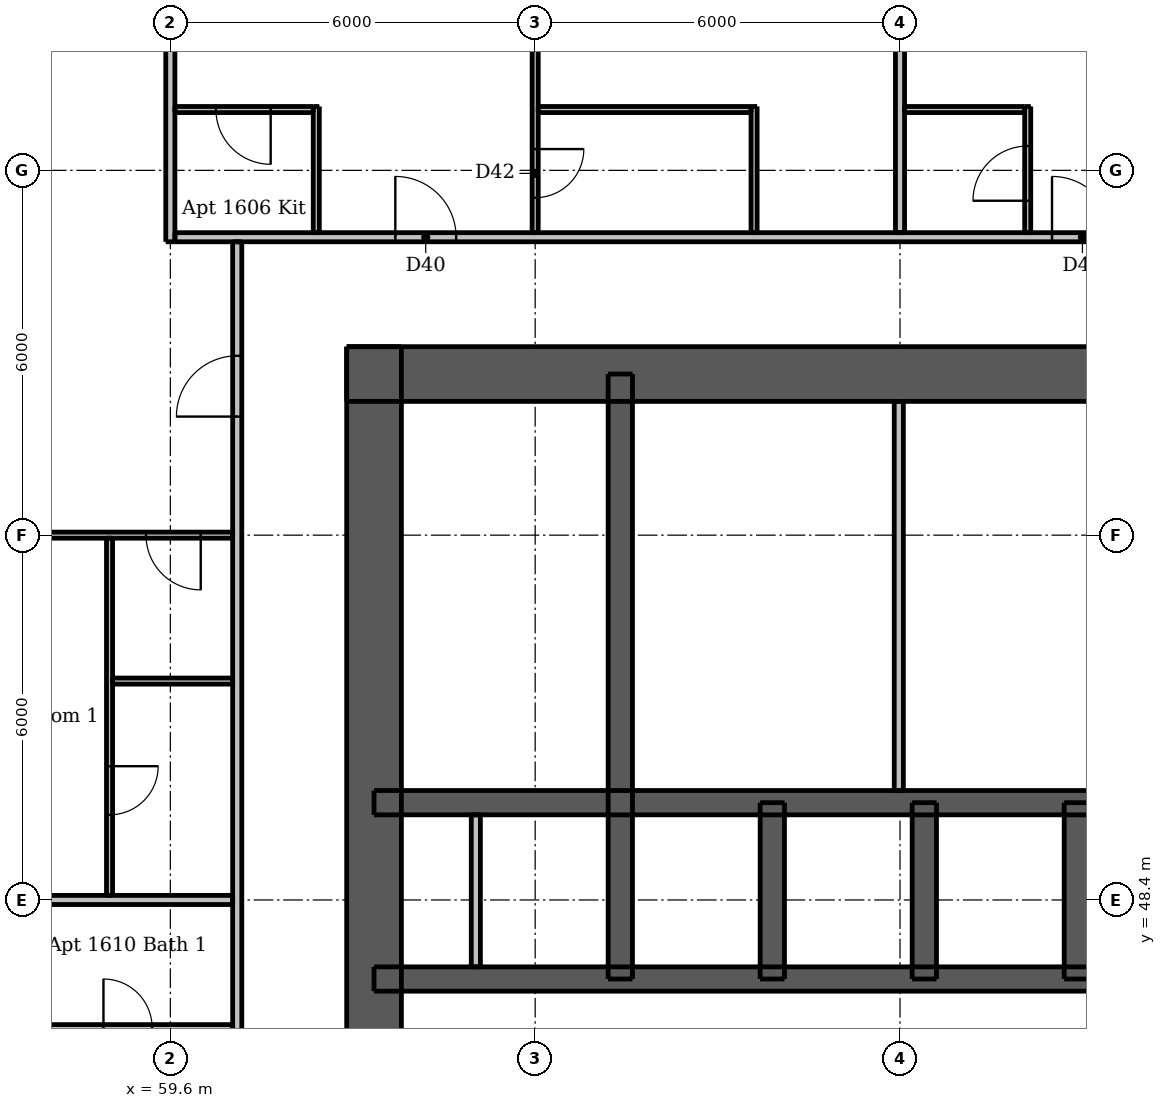
"""IFC4 building model, lengths in metres.
Left out: names, types, materials, properties, quantities, classifications, styles, units other than length and angle.
Written with IfcOpenShell. Run it as: python <this file> out.ifc"""

import sys

from ifc_helpers import new_model, si_unit, direction, frame, frame_2d, origin, place, context, subcontext, project, spatial, rectangle, extrude, element, fill, save


model = new_model("IFC4")
c1 = context("Model", 3, precision=1e-05, world=origin(), true_north=direction((0.0, 1.0)))
c2 = subcontext(c1, "Body", "Model", "MODEL_VIEW")
j1 = project(units=[si_unit("LENGTHUNIT", "METRE"), si_unit("PLANEANGLEUNIT", "RADIAN")], contexts=[c1])
p1 = place(None, origin())
s1 = spatial("IfcSite", under=j1, at=p1, CompositionType="ELEMENT")
p2 = place(p1, origin())
s2 = spatial("IfcBuilding", under=s1, at=p2, CompositionType="ELEMENT")
p3 = place(p2, frame((0.0, 0.0, 59.8)))
s3 = spatial("IfcBuildingStorey", under=s2, at=p3, CompositionType="ELEMENT", Elevation=59.8)
p4 = place(p3, frame((62.5, 57.05, 0.0), z_axis=(0.0, 0.0, 1.0), x_axis=(1.0, 0.0, 0.0)))
e1 = element("IfcWall", 1, at=p4, inside=s3, PredefinedType="SHEAR", context=c2, shape_type="SweptSolid", body=[
    extrude(rectangle(XDim=24.0, YDim=0.9, at=frame_2d((12.0, 0.0))), origin(), (0.0, 0.0, 1.0), 3.05),
])
p5 = place(p4, frame((20.85, 0.0, 0.0)))
e2 = element("IfcOpeningElement", 2, at=p5, cuts=e1, PredefinedType="OPENING", context=c2, shape_type="SweptSolid", body=[
    extrude(rectangle(XDim=1.1, YDim=2.1, at=frame_2d((0.55, 1.05))), frame((0.0, 0.46, 0.0), z_axis=(0.0, -1.0, 0.0), x_axis=(1.0, 0.0, 0.0)), (0.0, 0.0, 1.0), 0.92),
])
p6 = place(p4, frame((2.05, 0.0, 0.0)))
e3 = element("IfcOpeningElement", 3, at=p6, cuts=e1, PredefinedType="OPENING", context=c2, shape_type="SweptSolid", body=[
    extrude(rectangle(XDim=1.1, YDim=2.1, at=frame_2d((0.55, 1.05))), frame((0.0, 0.46, 0.0), z_axis=(0.0, -1.0, 0.0), x_axis=(1.0, 0.0, 0.0)), (0.0, 0.0, 1.0), 0.92),
])
p7 = place(p4, frame((6.44, 0.0, 0.0)))
e4 = element("IfcOpeningElement", 4, at=p7, cuts=e1, PredefinedType="OPENING", context=c2, shape_type="SweptSolid", body=[
    extrude(rectangle(XDim=0.9, YDim=2.1, at=frame_2d((0.45, 1.05))), frame((0.0, 0.46, 0.0), z_axis=(0.0, -1.0, 0.0), x_axis=(1.0, 0.0, 0.0)), (0.0, 0.0, 1.0), 0.92),
])
p8 = place(p4, frame((13.74, 0.0, 0.0)))
e5 = element("IfcOpeningElement", 5, at=p8, cuts=e1, PredefinedType="OPENING", context=c2, shape_type="SweptSolid", body=[
    extrude(rectangle(XDim=0.9, YDim=2.1, at=frame_2d((0.45, 1.05))), frame((0.0, 0.46, 0.0), z_axis=(0.0, -1.0, 0.0), x_axis=(1.0, 0.0, 0.0)), (0.0, 0.0, 1.0), 0.92),
])
p9 = place(p3, frame((62.95, 33.5, 0.0), z_axis=(0.0, 0.0, 1.0), x_axis=(0.0, 1.0, 0.0)))
e6 = element("IfcWall", 6, at=p9, inside=s3, PredefinedType="SHEAR", context=c2, shape_type="SweptSolid", body=[
    extrude(rectangle(XDim=24.0, YDim=0.9, at=frame_2d((12.0, 0.0))), origin(), (0.0, 0.0, 1.0), 3.05),
])
p10 = place(p9, frame((11.2, 0.0, 0.0)))
e7 = element("IfcOpeningElement", 7, at=p10, cuts=e6, PredefinedType="OPENING", context=c2, shape_type="SweptSolid", body=[
    extrude(rectangle(XDim=1.6, YDim=2.1, at=frame_2d((0.8, 1.05))), frame((0.0, 0.46, 0.0), z_axis=(0.0, -1.0, 0.0), x_axis=(1.0, 0.0, 0.0)), (0.0, 0.0, 1.0), 0.92),
])
p11 = place(p3, frame((62.95, 47.1, 0.0), z_axis=(0.0, 0.0, 1.0), x_axis=(1.0, 0.0, 0.0)))
e8 = element("IfcWall", 8, at=p11, inside=s3, PredefinedType="SHEAR", context=c2, shape_type="SweptSolid", body=[
    extrude(rectangle(XDim=23.1, YDim=0.4, at=frame_2d((11.55, 0.0))), origin(), (0.0, 0.0, 1.0), 3.05),
])
p12 = place(p11, frame((0.662, 0.0, 0.0)))
e9 = element("IfcOpeningElement", 9, at=p12, cuts=e8, PredefinedType="OPENING", context=c2, shape_type="SweptSolid", body=[
    extrude(rectangle(XDim=0.8, YDim=2.1, at=frame_2d((0.4, 1.05))), frame((0.0, 0.21, 0.0), z_axis=(0.0, -1.0, 0.0), x_axis=(1.0, 0.0, 0.0)), (0.0, 0.0, 1.0), 0.42),
])
p13 = place(p11, frame((2.312, 0.0, 0.0)))
e10 = element("IfcOpeningElement", 10, at=p13, cuts=e8, PredefinedType="OPENING", context=c2, shape_type="SweptSolid", body=[
    extrude(rectangle(XDim=0.9, YDim=2.1, at=frame_2d((0.45, 1.05))), frame((0.0, 0.21, 0.0), z_axis=(0.0, -1.0, 0.0), x_axis=(1.0, 0.0, 0.0)), (0.0, 0.0, 1.0), 0.42),
])
p14 = place(p11, frame((20.5, 0.0, 0.0)))
e11 = element("IfcOpeningElement", 11, at=p14, cuts=e8, PredefinedType="OPENING", context=c2, shape_type="SweptSolid", body=[
    extrude(rectangle(XDim=0.9, YDim=2.1, at=frame_2d((0.45, 1.05))), frame((0.0, 0.21, 0.0), z_axis=(0.0, -1.0, 0.0), x_axis=(1.0, 0.0, 0.0)), (0.0, 0.0, 1.0), 0.42),
])
p15 = place(p3, frame((62.95, 50.0, 0.0), z_axis=(0.0, 0.0, 1.0), x_axis=(1.0, 0.0, 0.0)))
e12 = element("IfcWall", 12, at=p15, inside=s3, PredefinedType="SHEAR", context=c2, shape_type="SweptSolid", body=[
    extrude(rectangle(XDim=23.1, YDim=0.4, at=frame_2d((11.55, 0.0))), origin(), (0.0, 0.0, 1.0), 3.05),
])
p16 = place(p3, frame((67.0, 47.1, 0.0), z_axis=(0.0, 0.0, 1.0), x_axis=(0.0, 1.0, 0.0)))
e13 = element("IfcWall", 13, at=p16, inside=s3, PredefinedType="SHEAR", context=c2, shape_type="SweptSolid", body=[
    extrude(rectangle(XDim=9.95, YDim=0.4, at=frame_2d((4.975, 0.0))), origin(), (0.0, 0.0, 1.0), 3.05),
])
for number, where, z_axis, x_axis in (
    (14, (69.5, 47.1, 0.0), (0.0, 0.0, 1.0), (0.0, 1.0, 0.0)),
    (15, (72.0, 47.1, 0.0), (0.0, 0.0, 1.0), (0.0, 1.0, 0.0)),
    (16, (74.5, 47.1, 0.0), (0.0, 0.0, 1.0), (0.0, 1.0, 0.0)),
):
    element("IfcWall", number, at=place(p3, frame(where, z_axis=z_axis, x_axis=x_axis)), inside=s3, PredefinedType="SHEAR", context=c2, shape_type="SweptSolid", body=[
        extrude(rectangle(XDim=2.9, YDim=0.4, at=frame_2d((1.45, 0.0))), origin(), (0.0, 0.0, 1.0), 3.05),
    ])
p17 = place(p3, frame((64.624, 47.3, 0.0), z_axis=(0.0, 0.0, 1.0), x_axis=(0.0, 1.0, 0.0)))
e17 = element("IfcWall", 17, at=p17, inside=s3, PredefinedType="PLUMBINGWALL", context=c2, shape_type="SweptSolid", body=[
    extrude(rectangle(XDim=2.5, YDim=0.15, at=frame_2d((1.25, 0.0))), origin(), (0.0, 0.0, 1.0), 3.05),
])
p18 = place(p3, frame((71.58, 50.2, 0.0), z_axis=(0.0, 0.0, 1.0), x_axis=(0.0, 1.0, 0.0)))
e18 = element("IfcWall", 18, at=p18, inside=s3, PredefinedType="PLUMBINGWALL", context=c2, shape_type="SweptSolid", body=[
    extrude(rectangle(XDim=6.4, YDim=0.15, at=frame_2d((3.2, 0.0))), origin(), (0.0, 0.0, 1.0), 3.05),
])
p19 = place(p3, frame((58.6, 54.35, 0.0), z_axis=(0.0, 0.0, 1.0), x_axis=(0.0, -1.0, 0.0)))
e19 = element("IfcWall", 19, at=p19, inside=s3, PredefinedType="PARTITIONING", context=c2, shape_type="SweptSolid", body=[
    extrude(rectangle(XDim=5.875, YDim=0.1, at=frame_2d((2.938, 0.0))), origin(), (0.0, 0.0, 1.0), 3.05),
])
p20 = place(p19, frame((3.75, 0.0, 0.0)))
e20 = element("IfcOpeningElement", 20, at=p20, cuts=e19, PredefinedType="OPENING", context=c2, shape_type="SweptSolid", body=[
    extrude(rectangle(XDim=0.8, YDim=2.1, at=frame_2d((0.4, 1.05))), frame((0.0, 0.06, 0.0), z_axis=(0.0, -1.0, 0.0), x_axis=(1.0, 0.0, 0.0)), (0.0, 0.0, 1.0), 0.12),
])
p21 = place(p3, frame((62.0, 59.375, 0.0), z_axis=(0.0, 0.0, 1.0), x_axis=(0.0, 1.0, 0.0)))
e21 = element("IfcWall", 21, at=p21, inside=s3, PredefinedType="PARTITIONING", context=c2, shape_type="SweptSolid", body=[
    extrude(rectangle(XDim=2.075, YDim=0.1, at=frame_2d((1.038, 0.0))), origin(), (0.0, 0.0, 1.0), 3.05),
])
p22 = place(p3, frame((65.6, 68.0, 0.0), z_axis=(0.0, 0.0, 1.0), x_axis=(0.0, -1.0, 0.0)))
e22 = element("IfcWall", 22, at=p22, inside=s3, PredefinedType="PARTITIONING", context=c2, shape_type="SweptSolid", body=[
    extrude(rectangle(XDim=8.625, YDim=0.1, at=frame_2d((4.312, 0.0))), origin(), (0.0, 0.0, 1.0), 2.516),
])
p23 = place(p22, frame((2.85, 0.0, 0.0)))
e23 = element("IfcOpeningElement", 23, at=p23, cuts=e22, PredefinedType="OPENING", context=c2, shape_type="SweptSolid", body=[
    extrude(rectangle(XDim=0.9, YDim=2.1, at=frame_2d((0.45, 1.05))), frame((0.0, 0.06, 0.0), z_axis=(0.0, -1.0, 0.0), x_axis=(1.0, 0.0, 0.0)), (0.0, 0.0, 1.0), 0.12),
])
p24 = place(p22, frame((7.25, 0.0, 0.0)))
e24 = element("IfcOpeningElement", 24, at=p24, cuts=e22, PredefinedType="OPENING", context=c2, shape_type="SweptSolid", body=[
    extrude(rectangle(XDim=0.8, YDim=2.1, at=frame_2d((0.4, 1.05))), frame((0.0, 0.06, 0.0), z_axis=(0.0, -1.0, 0.0), x_axis=(1.0, 0.0, 0.0)), (0.0, 0.0, 1.0), 0.12),
])
p25 = place(p3, frame((69.2, 59.375, 0.0), z_axis=(0.0, 0.0, 1.0), x_axis=(0.0, 1.0, 0.0)))
e25 = element("IfcWall", 25, at=p25, inside=s3, PredefinedType="PARTITIONING", context=c2, shape_type="SweptSolid", body=[
    extrude(rectangle(XDim=2.075, YDim=0.1, at=frame_2d((1.038, 0.0))), origin(), (0.0, 0.0, 1.0), 3.05),
])
p26 = place(p3, frame((73.7, 59.375, 0.0), z_axis=(0.0, 0.0, 1.0), x_axis=(0.0, 1.0, 0.0)))
e26 = element("IfcWall", 26, at=p26, inside=s3, PredefinedType="PARTITIONING", context=c2, shape_type="SweptSolid", body=[
    extrude(rectangle(XDim=2.075, YDim=0.1, at=frame_2d((1.038, 0.0))), origin(), (0.0, 0.0, 1.0), 3.05),
])
p27 = place(p26, frame((0.525, 0.0, 0.0)))
e27 = element("IfcOpeningElement", 27, at=p27, cuts=e26, PredefinedType="OPENING", context=c2, shape_type="SweptSolid", body=[
    extrude(rectangle(XDim=0.9, YDim=2.1, at=frame_2d((0.45, 1.05))), frame((0.0, 0.06, 0.0), z_axis=(0.0, -1.0, 0.0), x_axis=(1.0, 0.0, 0.0)), (0.0, 0.0, 1.0), 0.12),
])
p28 = place(p3, frame((61.95, 61.4, 0.0), z_axis=(0.0, 0.0, 1.0), x_axis=(-1.0, 0.0, 0.0)))
e28 = element("IfcWall", 28, at=p28, inside=s3, PredefinedType="PARTITIONING", context=c2, shape_type="SweptSolid", body=[
    extrude(rectangle(XDim=2.275, YDim=0.1, at=frame_2d((1.137, 0.0))), origin(), (0.0, 0.0, 1.0), 3.05),
])
p29 = place(p28, frame((0.7, 0.0, 0.0)))
e29 = element("IfcOpeningElement", 29, at=p29, cuts=e28, PredefinedType="OPENING", context=c2, shape_type="SweptSolid", body=[
    extrude(rectangle(XDim=0.9, YDim=2.1, at=frame_2d((0.45, 1.05))), frame((0.0, 0.06, 0.0), z_axis=(0.0, -1.0, 0.0), x_axis=(1.0, 0.0, 0.0)), (0.0, 0.0, 1.0), 0.12),
])
p30 = place(p3, frame((65.65, 61.4, 0.0), z_axis=(0.0, 0.0, 1.0), x_axis=(1.0, 0.0, 0.0)))
e30 = element("IfcWall", 30, at=p30, inside=s3, PredefinedType="PARTITIONING", context=c2, shape_type="SweptSolid", body=[
    extrude(rectangle(XDim=3.5, YDim=0.1, at=frame_2d((1.75, 0.0))), origin(), (0.0, 0.0, 1.0), 3.05),
])
p31 = place(p3, frame((71.675, 61.4, 0.0), z_axis=(0.0, 0.0, 1.0), x_axis=(1.0, 0.0, 0.0)))
e31 = element("IfcWall", 31, at=p31, inside=s3, PredefinedType="PARTITIONING", context=c2, shape_type="SweptSolid", body=[
    extrude(rectangle(XDim=1.975, YDim=0.1, at=frame_2d((0.987, 0.0))), origin(), (0.0, 0.0, 1.0), 3.05),
])
p32 = place(p3, frame((60.625, 54.4, 0.0), z_axis=(0.0, 0.0, 1.0), x_axis=(-1.0, 0.0, 0.0)))
e32 = element("IfcWall", 32, at=p32, inside=s3, PredefinedType="PARTITIONING", context=c2, shape_type="SweptSolid", body=[
    extrude(rectangle(XDim=8.625, YDim=0.1, at=frame_2d((4.312, 0.0))), origin(), (0.0, 0.0, 1.0), 2.516),
])
p33 = place(p32, frame((0.525, 0.0, 0.0)))
e33 = element("IfcOpeningElement", 33, at=p33, cuts=e32, PredefinedType="OPENING", context=c2, shape_type="SweptSolid", body=[
    extrude(rectangle(XDim=0.9, YDim=2.1, at=frame_2d((0.45, 1.05))), frame((0.0, 0.06, 0.0), z_axis=(0.0, -1.0, 0.0), x_axis=(1.0, 0.0, 0.0)), (0.0, 0.0, 1.0), 0.12),
])
p34 = place(p32, frame((4.875, 0.0, 0.0)))
e34 = element("IfcOpeningElement", 34, at=p34, cuts=e32, PredefinedType="OPENING", context=c2, shape_type="SweptSolid", body=[
    extrude(rectangle(XDim=0.9, YDim=2.1, at=frame_2d((0.45, 1.05))), frame((0.0, 0.06, 0.0), z_axis=(0.0, -1.0, 0.0), x_axis=(1.0, 0.0, 0.0)), (0.0, 0.0, 1.0), 0.12),
])
p35 = place(p3, frame((58.65, 52.0, 0.0), z_axis=(0.0, 0.0, 1.0), x_axis=(1.0, 0.0, 0.0)))
e35 = element("IfcWall", 35, at=p35, inside=s3, PredefinedType="PARTITIONING", context=c2, shape_type="SweptSolid", body=[
    extrude(rectangle(XDim=1.975, YDim=0.1, at=frame_2d((0.988, 0.0))), origin(), (0.0, 0.0, 1.0), 3.05),
])
p36 = place(p3, frame((57.15, 46.3, 0.0), z_axis=(0.0, 0.0, 1.0), x_axis=(1.0, 0.0, 0.0)))
e36 = element("IfcWall", 36, at=p36, inside=s3, PredefinedType="PARTITIONING", context=c2, shape_type="SweptSolid", body=[
    extrude(rectangle(XDim=3.475, YDim=0.1, at=frame_2d((1.738, 0.0))), origin(), (0.0, 0.0, 1.0), 3.05),
])
p37 = place(p36, frame((1.35, 0.0, 0.0)))
e37 = element("IfcOpeningElement", 37, at=p37, cuts=e36, PredefinedType="OPENING", context=c2, shape_type="SweptSolid", body=[
    extrude(rectangle(XDim=0.8, YDim=2.1, at=frame_2d((0.4, 1.05))), frame((0.0, 0.06, 0.0), z_axis=(0.0, -1.0, 0.0), x_axis=(1.0, 0.0, 0.0)), (0.0, 0.0, 1.0), 0.12),
])
p38 = place(p3, frame((59.6, 59.225, 0.0), z_axis=(0.0, 0.0, 1.0), x_axis=(0.0, 1.0, 0.0)))
e38 = element("IfcWall", 38, at=p38, inside=s3, PredefinedType="PARTITIONING", context=c2, shape_type="SweptSolid", body=[
    extrude(rectangle(XDim=8.775, YDim=0.15, at=frame_2d((4.387, 0.0))), origin(), (0.0, 0.0, 1.0), 2.51),
])
p39 = place(p3, frame((60.7, 30.325, 0.0), z_axis=(0.0, 0.0, 1.0), x_axis=(0.0, 1.0, 0.0)))
e39 = element("IfcWall", 39, at=p39, inside=s3, PredefinedType="PARTITIONING", context=c2, shape_type="SweptSolid", body=[
    extrude(rectangle(XDim=28.9, YDim=0.15, at=frame_2d((14.45, 0.0))), origin(), (0.0, 0.0, 1.0), 3.05),
])
p40 = place(p39, frame((7.375, 0.0, 0.0)))
e40 = element("IfcOpeningElement", 40, at=p40, cuts=e39, PredefinedType="OPENING", context=c2, shape_type="SweptSolid", body=[
    extrude(rectangle(XDim=1.0, YDim=2.1, at=frame_2d((0.5, 1.05))), frame((0.0, 0.085, 0.0), z_axis=(0.0, -1.0, 0.0), x_axis=(1.0, 0.0, 0.0)), (0.0, 0.0, 1.0), 0.17),
])
p41 = place(p39, frame((14.575, 0.0, 0.0)))
e41 = element("IfcOpeningElement", 41, at=p41, cuts=e39, PredefinedType="OPENING", context=c2, shape_type="SweptSolid", body=[
    extrude(rectangle(XDim=1.0, YDim=2.1, at=frame_2d((0.5, 1.05))), frame((0.0, 0.085, 0.0), z_axis=(0.0, -1.0, 0.0), x_axis=(1.0, 0.0, 0.0)), (0.0, 0.0, 1.0), 0.17),
])
p42 = place(p39, frame((26.025, 0.0, 0.0)))
e42 = element("IfcOpeningElement", 42, at=p42, cuts=e39, PredefinedType="OPENING", context=c2, shape_type="SweptSolid", body=[
    extrude(rectangle(XDim=1.0, YDim=2.1, at=frame_2d((0.5, 1.05))), frame((0.0, 0.085, 0.0), z_axis=(0.0, -1.0, 0.0), x_axis=(1.0, 0.0, 0.0)), (0.0, 0.0, 1.0), 0.17),
])
p43 = place(p3, frame((71.6, 59.375, 0.0), z_axis=(0.0, 0.0, 1.0), x_axis=(0.0, 1.0, 0.0)))
e43 = element("IfcWall", 43, at=p43, inside=s3, PredefinedType="PARTITIONING", context=c2, shape_type="SweptSolid", body=[
    extrude(rectangle(XDim=8.625, YDim=0.15, at=frame_2d((4.312, 0.0))), origin(), (0.0, 0.0, 1.0), 2.516),
])
p44 = place(p3, frame((59.675, 59.3, 0.0), z_axis=(0.0, 0.0, 1.0), x_axis=(1.0, 0.0, 0.0)))
e44 = element("IfcWall", 44, at=p44, inside=s3, PredefinedType="PARTITIONING", context=c2, shape_type="SweptSolid", body=[
    extrude(rectangle(XDim=28.55, YDim=0.15, at=frame_2d((14.275, 0.0))), origin(), (0.0, 0.0, 1.0), 3.05),
])
p45 = place(p44, frame((3.625, 0.0, 0.0)))
e45 = element("IfcOpeningElement", 45, at=p45, cuts=e44, PredefinedType="OPENING", context=c2, shape_type="SweptSolid", body=[
    extrude(rectangle(XDim=1.0, YDim=2.1, at=frame_2d((0.5, 1.05))), frame((0.0, 0.085, 0.0), z_axis=(0.0, -1.0, 0.0), x_axis=(1.0, 0.0, 0.0)), (0.0, 0.0, 1.0), 0.17),
])
p46 = place(p44, frame((14.425, 0.0, 0.0)))
e46 = element("IfcOpeningElement", 46, at=p46, cuts=e44, PredefinedType="OPENING", context=c2, shape_type="SweptSolid", body=[
    extrude(rectangle(XDim=1.0, YDim=2.1, at=frame_2d((0.5, 1.05))), frame((0.0, 0.085, 0.0), z_axis=(0.0, -1.0, 0.0), x_axis=(1.0, 0.0, 0.0)), (0.0, 0.0, 1.0), 0.17),
])
p47 = place(p44, frame((25.775, 0.0, 0.0)))
e47 = element("IfcOpeningElement", 47, at=p47, cuts=e44, PredefinedType="OPENING", context=c2, shape_type="SweptSolid", body=[
    extrude(rectangle(XDim=1.0, YDim=2.1, at=frame_2d((0.5, 1.05))), frame((0.0, 0.085, 0.0), z_axis=(0.0, -1.0, 0.0), x_axis=(1.0, 0.0, 0.0)), (0.0, 0.0, 1.0), 0.17),
])
p48 = place(p3, frame((52.0, 48.4, 0.0), z_axis=(0.0, 0.0, 1.0), x_axis=(1.0, 0.0, 0.0)))
e48 = element("IfcWall", 48, at=p48, inside=s3, PredefinedType="PARTITIONING", context=c2, shape_type="SweptSolid", body=[
    extrude(rectangle(XDim=8.625, YDim=0.15, at=frame_2d((4.312, 0.0))), origin(), (0.0, 0.0, 1.0), 2.516),
])
p49 = place(p6, origin())
e49 = element("IfcDoor", 49, at=p49, inside=s3, OperationType="SINGLE_SWING_LEFT", PredefinedType="DOOR", context=c2, shape_type="SweptSolid", body=[
    extrude(rectangle(XDim=1.1, YDim=2.1, at=frame_2d((0.55, 1.05))), frame((0.0, -0.388, 0.0), z_axis=(0.0, -1.0, 0.0), x_axis=(1.0, 0.0, 0.0)), (0.0, 0.0, 1.0), 0.05),
])
fill(e3, e49)
p50 = place(p12, origin())
e50 = element("IfcDoor", 50, at=p50, inside=s3, OperationType="SINGLE_SWING_LEFT", PredefinedType="DOOR", context=c2, shape_type="SweptSolid", body=[
    extrude(rectangle(XDim=0.8, YDim=2.1, at=frame_2d((0.4, 1.05))), frame((0.0, 0.188, 0.0), z_axis=(0.0, -1.0, 0.0), x_axis=(1.0, 0.0, 0.0)), (0.0, 0.0, 1.0), 0.05),
])
fill(e9, e50)
p51 = place(p13, origin())
e51 = element("IfcDoor", 51, at=p51, inside=s3, OperationType="SINGLE_SWING_RIGHT", PredefinedType="DOOR", context=c2, shape_type="SweptSolid", body=[
    extrude(rectangle(XDim=0.9, YDim=2.1, at=frame_2d((0.45, 1.05))), frame((0.0, 0.188, 0.0), z_axis=(0.0, -1.0, 0.0), x_axis=(1.0, 0.0, 0.0)), (0.0, 0.0, 1.0), 0.05),
])
fill(e10, e51)
p52 = place(p7, origin())
e52 = element("IfcDoor", 52, at=p52, inside=s3, OperationType="SINGLE_SWING_RIGHT", PredefinedType="DOOR", context=c2, shape_type="SweptSolid", body=[
    extrude(rectangle(XDim=0.9, YDim=2.1, at=frame_2d((0.45, 1.05))), frame((0.0, -0.388, 0.0), z_axis=(0.0, -1.0, 0.0), x_axis=(1.0, 0.0, 0.0)), (0.0, 0.0, 1.0), 0.05),
])
fill(e4, e52)
p53 = place(p45, origin())
e53 = element("IfcDoor", 53, at=p53, inside=s3, OperationType="SINGLE_SWING_LEFT", PredefinedType="DOOR", context=c2, shape_type="SweptSolid", body=[
    extrude(rectangle(XDim=1.0, YDim=2.1, at=frame_2d((0.5, 1.05))), frame((0.0, 0.025, 0.0), z_axis=(0.0, -1.0, 0.0), x_axis=(1.0, 0.0, 0.0)), (0.0, 0.0, 1.0), 0.05),
])
fill(e45, e53)
p54 = place(p29, origin())
e54 = element("IfcDoor", 54, at=p54, inside=s3, OperationType="SINGLE_SWING_LEFT", PredefinedType="DOOR", context=c2, shape_type="SweptSolid", body=[
    extrude(rectangle(XDim=0.9, YDim=2.1, at=frame_2d((0.45, 1.05))), frame((0.0, 0.025, 0.0), z_axis=(0.0, -1.0, 0.0), x_axis=(1.0, 0.0, 0.0)), (0.0, 0.0, 1.0), 0.05),
])
fill(e29, e54)
p55 = place(p24, origin())
e55 = element("IfcDoor", 55, at=p55, inside=s3, OperationType="SINGLE_SWING_LEFT", PredefinedType="DOOR", context=c2, shape_type="SweptSolid", body=[
    extrude(rectangle(XDim=0.8, YDim=2.1, at=frame_2d((0.4, 1.05))), frame((0.0, 0.025, 0.0), z_axis=(0.0, -1.0, 0.0), x_axis=(1.0, 0.0, 0.0)), (0.0, 0.0, 1.0), 0.05),
])
fill(e24, e55)
p56 = place(p46, origin())
e56 = element("IfcDoor", 56, at=p56, inside=s3, OperationType="SINGLE_SWING_LEFT", PredefinedType="DOOR", context=c2, shape_type="SweptSolid", body=[
    extrude(rectangle(XDim=1.0, YDim=2.1, at=frame_2d((0.5, 1.05))), frame((0.0, 0.025, 0.0), z_axis=(0.0, -1.0, 0.0), x_axis=(1.0, 0.0, 0.0)), (0.0, 0.0, 1.0), 0.05),
])
fill(e46, e56)
p57 = place(p27, origin())
e57 = element("IfcDoor", 57, at=p57, inside=s3, OperationType="SINGLE_SWING_LEFT", PredefinedType="DOOR", context=c2, shape_type="SweptSolid", body=[
    extrude(rectangle(XDim=0.9, YDim=2.1, at=frame_2d((0.45, 1.05))), frame((0.0, 0.025, 0.0), z_axis=(0.0, -1.0, 0.0), x_axis=(1.0, 0.0, 0.0)), (0.0, 0.0, 1.0), 0.05),
])
fill(e27, e57)
p58 = place(p37, origin())
e58 = element("IfcDoor", 58, at=p58, inside=s3, OperationType="SINGLE_SWING_LEFT", PredefinedType="DOOR", context=c2, shape_type="SweptSolid", body=[
    extrude(rectangle(XDim=0.8, YDim=2.1, at=frame_2d((0.4, 1.05))), frame((0.0, 0.025, 0.0), z_axis=(0.0, -1.0, 0.0), x_axis=(1.0, 0.0, 0.0)), (0.0, 0.0, 1.0), 0.05),
])
fill(e37, e58)
p59 = place(p42, origin())
e59 = element("IfcDoor", 59, at=p59, inside=s3, OperationType="SINGLE_SWING_LEFT", PredefinedType="DOOR", context=c2, shape_type="SweptSolid", body=[
    extrude(rectangle(XDim=1.0, YDim=2.1, at=frame_2d((0.5, 1.05))), frame((0.0, 0.025, 0.0), z_axis=(0.0, -1.0, 0.0), x_axis=(1.0, 0.0, 0.0)), (0.0, 0.0, 1.0), 0.05),
])
fill(e42, e59)
p60 = place(p33, origin())
e60 = element("IfcDoor", 60, at=p60, inside=s3, OperationType="SINGLE_SWING_LEFT", PredefinedType="DOOR", context=c2, shape_type="SweptSolid", body=[
    extrude(rectangle(XDim=0.9, YDim=2.1, at=frame_2d((0.45, 1.05))), frame((0.0, 0.025, 0.0), z_axis=(0.0, -1.0, 0.0), x_axis=(1.0, 0.0, 0.0)), (0.0, 0.0, 1.0), 0.05),
])
fill(e33, e60)
p61 = place(p20, origin())
e61 = element("IfcDoor", 61, at=p61, inside=s3, OperationType="SINGLE_SWING_LEFT", PredefinedType="DOOR", context=c2, shape_type="SweptSolid", body=[
    extrude(rectangle(XDim=0.8, YDim=2.1, at=frame_2d((0.4, 1.05))), frame((0.0, 0.025, 0.0), z_axis=(0.0, -1.0, 0.0), x_axis=(1.0, 0.0, 0.0)), (0.0, 0.0, 1.0), 0.05),
])
fill(e20, e61)
save(model, sys.argv[1])
